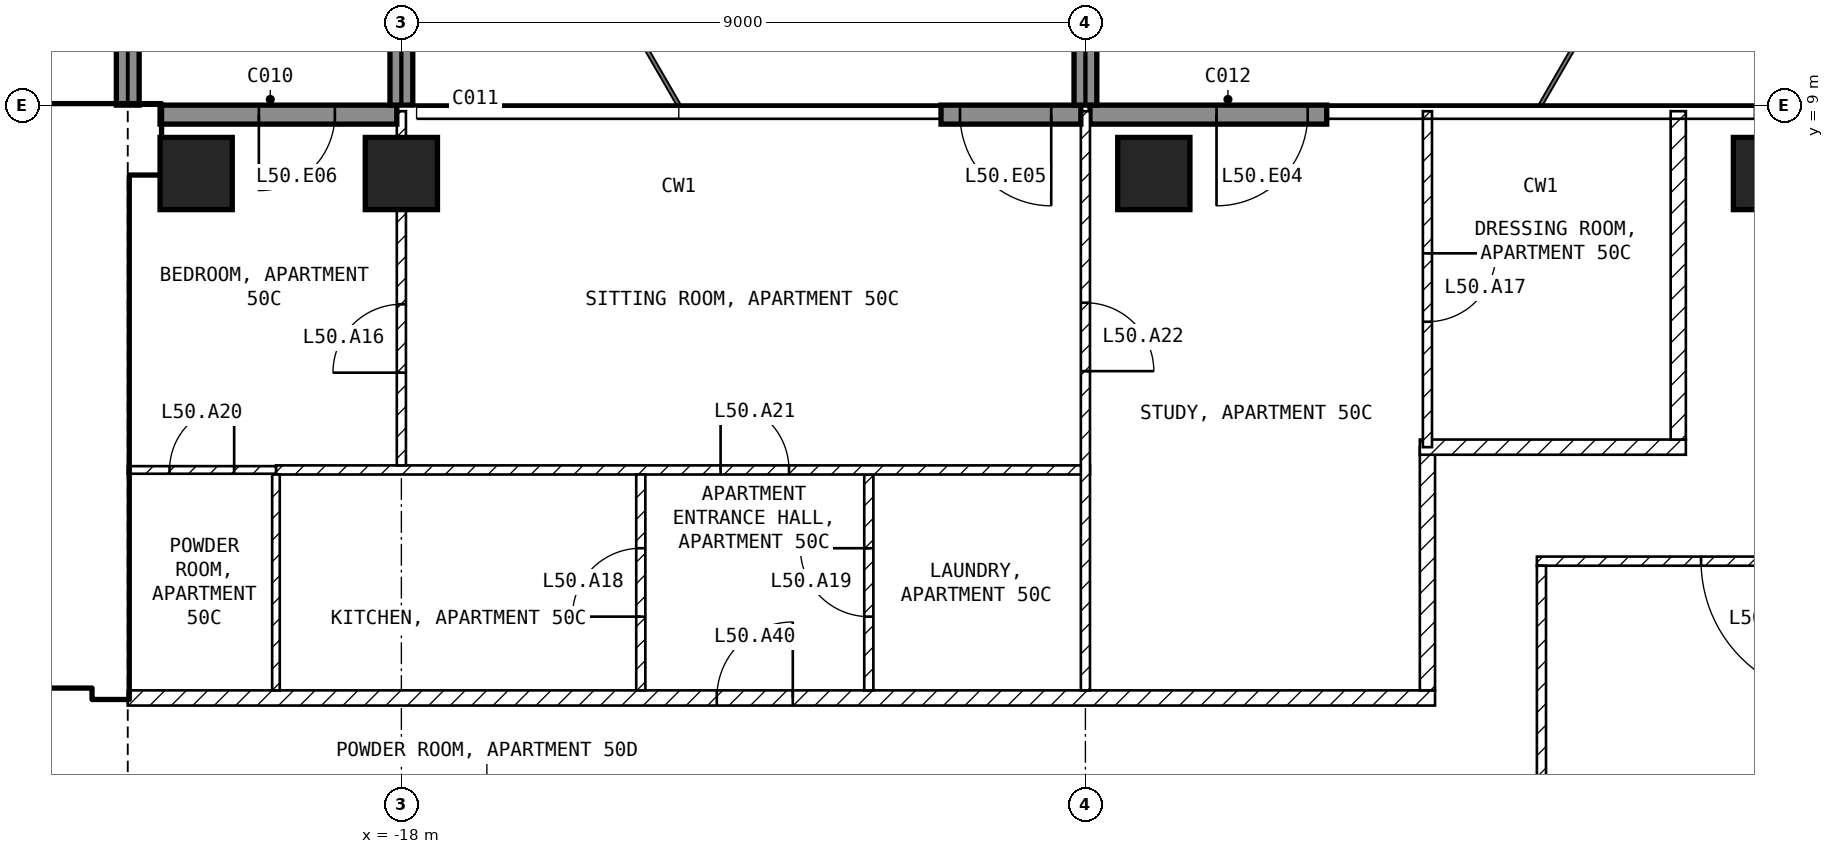
"""IFC4 building model, lengths in metres.
Left out: names, types, materials, properties, quantities, classifications, styles, units other than length and angle.
Written with IfcOpenShell. Run it as: python <this file> out.ifc"""

import sys

from ifc_helpers import new_model, si_unit, direction, frame, frame_2d, origin, origin_2d, place, context, subcontext, project, spatial, rectangle, extrude, element, fill, save


model = new_model("IFC4")
c1 = context("Model", 3, precision=1e-05, world=origin(), true_north=direction((0.0, 1.0)))
c2 = subcontext(c1, "Body", "Model", "MODEL_VIEW")
j1 = project(units=[si_unit("LENGTHUNIT", "METRE"), si_unit("PLANEANGLEUNIT", "RADIAN")], contexts=[c1])
p1 = place(None, origin())
s1 = spatial("IfcSite", under=j1, at=p1, CompositionType="ELEMENT")
p2 = place(p1, origin())
s2 = spatial("IfcBuilding", under=s1, at=p2, CompositionType="ELEMENT")
p3 = place(p2, frame((0.0, 0.0, 201.6)))
s3 = spatial("IfcBuildingStorey", under=s2, at=p3, CompositionType="ELEMENT", Elevation=201.6)
for number, where, z_axis, x_axis in (
    (1, (-20.7, 8.1, -0.25), (0.0, 0.0, 1.0), (1.0, 0.0, 0.0)),
    (2, (-18.0, 8.1, -0.25), (0.0, 0.0, 1.0), (1.0, 0.0, 0.0)),
    (3, (-8.1, 8.1, -0.25), (0.0, 0.0, 1.0), (1.0, 0.0, 0.0)),
    (4, (0.0, 8.1, -0.25), (0.0, 0.0, 1.0), (1.0, 0.0, 0.0)),
):
    element("IfcColumn", number, at=place(p3, frame(where, z_axis=z_axis, x_axis=x_axis)), inside=s3, PredefinedType="COLUMN", context=c2, shape_type="SweptSolid", body=[
        extrude(rectangle(XDim=0.95, YDim=0.95, at=origin_2d()), origin(), (0.0, 0.0, 1.0), 3.5),
    ])
p4 = place(p3, frame((-5.825, 8.875, 0.0), z_axis=(0.0, 0.0, 1.0), x_axis=(-1.0, 0.0, 0.0)))
e5 = element("IfcWall", 5, at=p4, inside=s3, PredefinedType="SOLIDWALL", context=c2, shape_type="SweptSolid", body=[
    extrude(rectangle(XDim=3.115, YDim=0.25, at=frame_2d((1.558, 0.0))), origin(), (0.0, 0.0, 1.0), 3.25),
])
p5 = place(p4, frame((0.25, 0.0, 0.0)))
e6 = element("IfcOpeningElement", 6, at=p5, cuts=e5, PredefinedType="OPENING", context=c2, shape_type="SweptSolid", body=[
    extrude(rectangle(XDim=1.2, YDim=2.4, at=frame_2d((0.6, 1.2))), frame((0.0, 0.135, 0.0), z_axis=(0.0, -1.0, 0.0), x_axis=(1.0, 0.0, 0.0)), (0.0, 0.0, 1.0), 0.27),
])
p6 = place(p3, frame((-9.06, 8.875, 0.0), z_axis=(0.0, 0.0, 1.0), x_axis=(-1.0, 0.0, 0.0)))
e7 = element("IfcWall", 7, at=p6, inside=s3, PredefinedType="SOLIDWALL", context=c2, shape_type="SweptSolid", body=[
    extrude(rectangle(XDim=1.84, YDim=0.25, at=frame_2d((0.92, 0.0))), origin(), (0.0, 0.0, 1.0), 3.25),
])
p7 = place(p6, frame((0.39, 0.0, 0.0)))
e8 = element("IfcOpeningElement", 8, at=p7, cuts=e7, PredefinedType="OPENING", context=c2, shape_type="SweptSolid", body=[
    extrude(rectangle(XDim=1.2, YDim=2.4, at=frame_2d((0.6, 1.2))), frame((0.0, 0.135, 0.0), z_axis=(0.0, -1.0, 0.0), x_axis=(1.0, 0.0, 0.0)), (0.0, 0.0, 1.0), 0.27),
])
p8 = place(p3, frame((-18.06, 8.875, 0.0), z_axis=(0.0, 0.0, 1.0), x_axis=(-1.0, 0.0, 0.0)))
e9 = element("IfcWall", 9, at=p8, inside=s3, PredefinedType="SOLIDWALL", context=c2, shape_type="SweptSolid", body=[
    extrude(rectangle(XDim=3.115, YDim=0.25, at=frame_2d((1.558, 0.0))), origin(), (0.0, 0.0, 1.0), 3.25),
])
p9 = place(p8, frame((0.815, 0.0, 0.0)))
e10 = element("IfcOpeningElement", 10, at=p9, cuts=e9, PredefinedType="OPENING", context=c2, shape_type="SweptSolid", body=[
    extrude(rectangle(XDim=1.0, YDim=2.4, at=frame_2d((0.5, 1.2))), frame((0.0, 0.135, 0.0), z_axis=(0.0, -1.0, 0.0), x_axis=(1.0, 0.0, 0.0)), (0.0, 0.0, 1.0), 0.27),
])
for number, where, z_axis, x_axis in (
    (11, (-21.6, 9.0, 0.0), (0.0, 0.0, 1.0), (0.0, 1.0, 0.0)),
    (12, (-18.0, 9.0, 0.0), (0.0, 0.0, 1.0), (0.0, 1.0, 0.0)),
    (13, (-9.0, 9.0, 0.0), (0.0, 0.0, 1.0), (0.0, 1.0, 0.0)),
):
    element("IfcWall", number, at=place(p3, frame(where, z_axis=z_axis, x_axis=x_axis)), inside=s3, PredefinedType="SOLIDWALL", context=c2, shape_type="SweptSolid", body=[
        extrude(rectangle(XDim=2.7, YDim=0.3, at=frame_2d((1.35, 0.0))), origin(), (0.0, 0.0, 1.0), 3.25),
    ])
p10 = place(p3, frame((-29.6, 8.55, 0.0), z_axis=(0.0, 0.0, 1.0), x_axis=(1.0, 0.0, 0.0)))
e14 = element("IfcWall", 14, at=p10, inside=s3, PredefinedType="SHEAR", context=c2, shape_type="SweptSolid", body=[
    extrude(rectangle(XDim=8.425, YDim=0.9, at=frame_2d((4.212, 0.0))), origin(), (0.0, 0.0, 1.0), 3.25),
])
p11 = place(p3, frame((-21.825, 1.2, 0.0), z_axis=(0.0, 0.0, 1.0), x_axis=(0.0, 1.0, 0.0)))
e15 = element("IfcWall", 15, at=p11, inside=s3, PredefinedType="SHEAR", context=c2, shape_type="SweptSolid", body=[
    extrude(rectangle(XDim=6.9, YDim=0.45, at=frame_2d((3.45, 0.0))), origin(), (0.0, 0.0, 1.0), 3.25),
])
p12 = place(p3, frame((-33.2, 1.45, 0.0), z_axis=(0.0, 0.0, 1.0), x_axis=(1.0, 0.0, 0.0)))
e16 = element("IfcWall", 16, at=p12, inside=s3, PredefinedType="SOLIDWALL", context=c2, shape_type="SweptSolid", body=[
    extrude(rectangle(XDim=11.15, YDim=0.2, at=frame_2d((5.575, 0.0))), origin(), (0.0, 0.0, 1.0), 3.25),
])
p13 = place(p12, frame((9.4, 0.0, 0.0)))
e17 = element("IfcOpeningElement", 17, at=p13, cuts=e16, PredefinedType="OPENING", context=c2, shape_type="SweptSolid", body=[
    extrude(rectangle(XDim=1.0, YDim=2.1, at=frame_2d((0.5, 1.05))), frame((0.0, 0.11, 0.0), z_axis=(0.0, -1.0, 0.0), x_axis=(1.0, 0.0, 0.0)), (0.0, 0.0, 1.0), 0.22),
])
p14 = place(p12, frame((6.9, 0.0, 0.0)))
e18 = element("IfcOpeningElement", 18, at=p14, cuts=e16, PredefinedType="OPENING", context=c2, shape_type="SweptSolid", body=[
    extrude(rectangle(XDim=1.0, YDim=2.1, at=frame_2d((0.5, 1.05))), frame((0.0, 0.11, 0.0), z_axis=(0.0, -1.0, 0.0), x_axis=(1.0, 0.0, 0.0)), (0.0, 0.0, 1.0), 0.22),
])
p15 = place(p12, frame((1.1, 0.0, 0.0)))
e19 = element("IfcOpeningElement", 19, at=p15, cuts=e16, PredefinedType="OPENING", context=c2, shape_type="SweptSolid", body=[
    extrude(rectangle(XDim=0.9, YDim=2.1, at=frame_2d((0.45, 1.05))), frame((0.0, 0.11, 0.0), z_axis=(0.0, -1.0, 0.0), x_axis=(1.0, 0.0, 0.0)), (0.0, 0.0, 1.0), 0.22),
])
p16 = place(p3, frame((-28.35, 5.15, 0.0), z_axis=(0.0, 0.0, 1.0), x_axis=(1.0, 0.0, 0.0)))
e20 = element("IfcWall", 20, at=p16, inside=s3, PredefinedType="SOLIDWALL", context=c2, shape_type="SweptSolid", body=[
    extrude(rectangle(XDim=6.3, YDim=0.2, at=frame_2d((3.15, 0.0))), origin(), (0.0, 0.0, 1.0), 3.25),
])
p17 = place(p16, frame((5.1, 0.0, 0.0)))
e21 = element("IfcOpeningElement", 21, at=p17, cuts=e20, PredefinedType="OPENING", context=c2, shape_type="SweptSolid", body=[
    extrude(rectangle(XDim=1.0, YDim=2.1, at=frame_2d((0.5, 1.05))), frame((0.0, 0.11, 0.0), z_axis=(0.0, -1.0, 0.0), x_axis=(1.0, 0.0, 0.0)), (0.0, 0.0, 1.0), 0.22),
])
p18 = place(p3, frame((3.06, 3.0, 0.0), z_axis=(0.0, 0.0, 1.0), x_axis=(-1.0, 0.0, 0.0)))
e22 = element("IfcWall", 22, at=p18, inside=s3, PredefinedType="PARTITIONING", context=c2, shape_type="SweptSolid", body=[
    extrude(rectangle(XDim=6.12, YDim=0.12, at=frame_2d((3.06, 0.0))), origin(), (0.0, 0.0, 1.0), 3.25),
])
p19 = place(p18, frame((2.16, 0.0, 0.0)))
e23 = element("IfcOpeningElement", 23, at=p19, cuts=e22, PredefinedType="OPENING", context=c2, shape_type="SweptSolid", body=[
    extrude(rectangle(XDim=1.8, YDim=2.1, at=frame_2d((0.9, 1.05))), frame((0.0, 0.07, 0.0), z_axis=(0.0, -1.0, 0.0), x_axis=(1.0, 0.0, 0.0)), (0.0, 0.0, 1.0), 0.14),
])
p20 = place(p3, frame((-3.0, 2.94, 0.0), z_axis=(0.0, 0.0, 1.0), x_axis=(0.0, -1.0, 0.0)))
e24 = element("IfcWall", 24, at=p20, inside=s3, PredefinedType="PARTITIONING", context=c2, shape_type="SweptSolid", body=[
    extrude(rectangle(XDim=5.88, YDim=0.12, at=frame_2d((2.94, 0.0))), origin(), (0.0, 0.0, 1.0), 3.25),
])
p21 = place(p3, frame((-21.6, 1.2, 0.0), z_axis=(0.0, 0.0, 1.0), x_axis=(1.0, 0.0, 0.0)))
e25 = element("IfcWall", 25, at=p21, inside=s3, PredefinedType="PARTITIONING", context=c2, shape_type="SweptSolid", body=[
    extrude(rectangle(XDim=17.2, YDim=0.2, at=frame_2d((8.6, 0.0))), origin(), (0.0, 0.0, 1.0), 3.25),
])
p22 = place(p21, frame((7.75, 0.0, 0.0)))
e26 = element("IfcOpeningElement", 26, at=p22, cuts=e25, PredefinedType="OPENING", context=c2, shape_type="SweptSolid", body=[
    extrude(rectangle(XDim=1.0, YDim=2.1, at=frame_2d((0.5, 1.05))), frame((0.0, 0.11, 0.0), z_axis=(0.0, -1.0, 0.0), x_axis=(1.0, 0.0, 0.0)), (0.0, 0.0, 1.0), 0.22),
])
p23 = place(p3, frame((-4.5, 1.3, 0.0), z_axis=(0.0, 0.0, 1.0), x_axis=(0.0, 1.0, 0.0)))
e27 = element("IfcWall", 27, at=p23, inside=s3, PredefinedType="PARTITIONING", context=c2, shape_type="SweptSolid", body=[
    extrude(rectangle(XDim=3.2, YDim=0.2, at=frame_2d((1.6, 0.0))), origin(), (0.0, 0.0, 1.0), 3.25),
])
p24 = place(p3, frame((-4.6, 4.5, 0.0), z_axis=(0.0, 0.0, 1.0), x_axis=(1.0, 0.0, 0.0)))
e28 = element("IfcWall", 28, at=p24, inside=s3, PredefinedType="PARTITIONING", context=c2, shape_type="SweptSolid", body=[
    extrude(rectangle(XDim=3.5, YDim=0.2, at=frame_2d((1.75, 0.0))), origin(), (0.0, 0.0, 1.0), 3.25),
])
p25 = place(p3, frame((-1.2, 4.6, 0.0), z_axis=(0.0, 0.0, 1.0), x_axis=(0.0, 1.0, 0.0)))
e29 = element("IfcWall", 29, at=p25, inside=s3, PredefinedType="PARTITIONING", context=c2, shape_type="SweptSolid", body=[
    extrude(rectangle(XDim=4.32, YDim=0.2, at=frame_2d((2.16, 0.0))), origin(), (0.0, 0.0, 1.0), 3.25),
])
p26 = place(p3, frame((-11.85, 1.3, 0.0), z_axis=(0.0, 0.0, 1.0), x_axis=(0.0, 1.0, 0.0)))
e30 = element("IfcWall", 30, at=p26, inside=s3, PredefinedType="PARTITIONING", context=c2, shape_type="SweptSolid", body=[
    extrude(rectangle(XDim=2.84, YDim=0.12, at=frame_2d((1.42, 0.0))), origin(), (0.0, 0.0, 1.0), 3.25),
])
p27 = place(p26, frame((0.97, 0.0, 0.0)))
e31 = element("IfcOpeningElement", 31, at=p27, cuts=e30, PredefinedType="OPENING", context=c2, shape_type="SweptSolid", body=[
    extrude(rectangle(XDim=0.9, YDim=2.1, at=frame_2d((0.45, 1.05))), frame((0.0, 0.07, 0.0), z_axis=(0.0, -1.0, 0.0), x_axis=(1.0, 0.0, 0.0)), (0.0, 0.0, 1.0), 0.14),
])
p28 = place(p3, frame((-19.65, 4.2, 0.0), z_axis=(0.0, 0.0, 1.0), x_axis=(1.0, 0.0, 0.0)))
e32 = element("IfcWall", 32, at=p28, inside=s3, PredefinedType="PARTITIONING", context=c2, shape_type="SweptSolid", body=[
    extrude(rectangle(XDim=10.71, YDim=0.12, at=frame_2d((5.355, 0.0))), origin(), (0.0, 0.0, 1.0), 3.25),
])
p29 = place(p28, frame((5.85, 0.0, 0.0)))
e33 = element("IfcOpeningElement", 33, at=p29, cuts=e32, PredefinedType="OPENING", context=c2, shape_type="SweptSolid", body=[
    extrude(rectangle(XDim=0.9, YDim=2.1, at=frame_2d((0.45, 1.05))), frame((0.0, 0.07, 0.0), z_axis=(0.0, -1.0, 0.0), x_axis=(1.0, 0.0, 0.0)), (0.0, 0.0, 1.0), 0.14),
])
p30 = place(p3, frame((-9.0, 8.92, 0.0), z_axis=(0.0, 0.0, 1.0), x_axis=(0.0, -1.0, 0.0)))
e34 = element("IfcWall", 34, at=p30, inside=s3, PredefinedType="PARTITIONING", context=c2, shape_type="SweptSolid", body=[
    extrude(rectangle(XDim=7.62, YDim=0.12, at=frame_2d((3.81, 0.0))), origin(), (0.0, 0.0, 1.0), 3.25),
])
p31 = place(p30, frame((2.52, 0.0, 0.0)))
e35 = element("IfcOpeningElement", 35, at=p31, cuts=e34, PredefinedType="OPENING", context=c2, shape_type="SweptSolid", body=[
    extrude(rectangle(XDim=0.9, YDim=2.1, at=frame_2d((0.45, 1.05))), frame((0.0, 0.07, 0.0), z_axis=(0.0, -1.0, 0.0), x_axis=(1.0, 0.0, 0.0)), (0.0, 0.0, 1.0), 0.14),
])
p32 = place(p3, frame((-14.85, 1.3, 0.0), z_axis=(0.0, 0.0, 1.0), x_axis=(0.0, 1.0, 0.0)))
e36 = element("IfcWall", 36, at=p32, inside=s3, PredefinedType="PARTITIONING", context=c2, shape_type="SweptSolid", body=[
    extrude(rectangle(XDim=2.84, YDim=0.12, at=frame_2d((1.42, 0.0))), origin(), (0.0, 0.0, 1.0), 3.25),
])
p33 = place(p32, frame((0.97, 0.0, 0.0)))
e37 = element("IfcOpeningElement", 37, at=p33, cuts=e36, PredefinedType="OPENING", context=c2, shape_type="SweptSolid", body=[
    extrude(rectangle(XDim=0.9, YDim=2.1, at=frame_2d((0.45, 1.05))), frame((0.0, 0.07, 0.0), z_axis=(0.0, -1.0, 0.0), x_axis=(1.0, 0.0, 0.0)), (0.0, 0.0, 1.0), 0.14),
])
p34 = place(p3, frame((-19.65, 1.3, 0.0), z_axis=(0.0, 0.0, 1.0), x_axis=(0.0, 1.0, 0.0)))
e38 = element("IfcWall", 38, at=p34, inside=s3, PredefinedType="PARTITIONING", context=c2, shape_type="SweptSolid", body=[
    extrude(rectangle(XDim=2.84, YDim=0.1, at=frame_2d((1.42, 0.0))), origin(), (0.0, 0.0, 1.0), 3.25),
])
p35 = place(p3, frame((-21.6, 4.2, 0.0), z_axis=(0.0, 0.0, 1.0), x_axis=(1.0, 0.0, 0.0)))
e39 = element("IfcWall", 39, at=p35, inside=s3, PredefinedType="PARTITIONING", context=c2, shape_type="SweptSolid", body=[
    extrude(rectangle(XDim=1.95, YDim=0.1, at=frame_2d((0.975, 0.0))), origin(), (0.0, 0.0, 1.0), 3.25),
])
p36 = place(p35, frame((0.55, 0.0, 0.0)))
e40 = element("IfcOpeningElement", 40, at=p36, cuts=e39, PredefinedType="OPENING", context=c2, shape_type="SweptSolid", body=[
    extrude(rectangle(XDim=0.85, YDim=2.1, at=frame_2d((0.425, 1.05))), frame((0.0, 0.06, 0.0), z_axis=(0.0, -1.0, 0.0), x_axis=(1.0, 0.0, 0.0)), (0.0, 0.0, 1.0), 0.12),
])
p37 = place(p3, frame((-18.0, 4.26, 0.0), z_axis=(0.0, 0.0, 1.0), x_axis=(0.0, 1.0, 0.0)))
e41 = element("IfcWall", 41, at=p37, inside=s3, PredefinedType="PARTITIONING", context=c2, shape_type="SweptSolid", body=[
    extrude(rectangle(XDim=4.66, YDim=0.12, at=frame_2d((2.33, 0.0))), origin(), (0.0, 0.0, 1.0), 2.48),
])
p38 = place(p37, frame((1.22, 0.0, 0.0)))
e42 = element("IfcOpeningElement", 42, at=p38, cuts=e41, PredefinedType="OPENING", context=c2, shape_type="SweptSolid", body=[
    extrude(rectangle(XDim=0.9, YDim=2.1, at=frame_2d((0.45, 1.05))), frame((0.0, 0.07, 0.0), z_axis=(0.0, -1.0, 0.0), x_axis=(1.0, 0.0, 0.0)), (0.0, 0.0, 1.0), 0.14),
])
p39 = place(p3, frame((-4.5, 8.92, 0.0), z_axis=(0.0, 0.0, 1.0), x_axis=(0.0, -1.0, 0.0)))
e43 = element("IfcWall", 43, at=p39, inside=s3, PredefinedType="PARTITIONING", context=c2, shape_type="SweptSolid", body=[
    extrude(rectangle(XDim=4.42, YDim=0.12, at=frame_2d((2.21, 0.0))), origin(), (0.0, 0.0, 1.0), 3.25),
])
p40 = place(p39, frame((1.87, 0.0, 0.0)))
e44 = element("IfcOpeningElement", 44, at=p40, cuts=e43, PredefinedType="OPENING", context=c2, shape_type="SweptSolid", body=[
    extrude(rectangle(XDim=0.9, YDim=2.1, at=frame_2d((0.45, 1.05))), frame((0.0, 0.07, 0.0), z_axis=(0.0, -1.0, 0.0), x_axis=(1.0, 0.0, 0.0)), (0.0, 0.0, 1.0), 0.14),
])
p41 = place(p5, origin())
e45 = element("IfcDoor", 45, at=p41, inside=s3, OperationType="SINGLE_SWING_RIGHT", PredefinedType="DOOR", context=c2, shape_type="SweptSolid", body=[
    extrude(rectangle(XDim=1.2, YDim=2.4, at=frame_2d((0.6, 1.2))), frame((0.0, 0.025, 0.0), z_axis=(0.0, -1.0, 0.0), x_axis=(1.0, 0.0, 0.0)), (0.0, 0.0, 1.0), 0.05),
])
fill(e6, e45)
p42 = place(p7, origin())
e46 = element("IfcDoor", 46, at=p42, inside=s3, OperationType="SINGLE_SWING_LEFT", PredefinedType="DOOR", context=c2, shape_type="SweptSolid", body=[
    extrude(rectangle(XDim=1.2, YDim=2.4, at=frame_2d((0.6, 1.2))), frame((0.0, 0.025, 0.0), z_axis=(0.0, -1.0, 0.0), x_axis=(1.0, 0.0, 0.0)), (0.0, 0.0, 1.0), 0.05),
])
fill(e8, e46)
p43 = place(p9, origin())
e47 = element("IfcDoor", 47, at=p43, inside=s3, OperationType="SINGLE_SWING_RIGHT", PredefinedType="DOOR", context=c2, shape_type="SweptSolid", body=[
    extrude(rectangle(XDim=1.0, YDim=2.4, at=frame_2d((0.5, 1.2))), frame((0.0, 0.025, 0.0), z_axis=(0.0, -1.0, 0.0), x_axis=(1.0, 0.0, 0.0)), (0.0, 0.0, 1.0), 0.05),
])
fill(e10, e47)
p44 = place(p17, origin())
e48 = element("IfcDoor", 48, at=p44, inside=s3, OperationType="SINGLE_SWING_LEFT", PredefinedType="DOOR", context=c2, shape_type="SweptSolid", body=[
    extrude(rectangle(XDim=1.0, YDim=2.1, at=frame_2d((0.5, 1.05))), frame((0.0, 0.025, 0.0), z_axis=(0.0, -1.0, 0.0), x_axis=(1.0, 0.0, 0.0)), (0.0, 0.0, 1.0), 0.05),
])
fill(e21, e48)
p45 = place(p19, origin())
e49 = element("IfcDoor", 49, at=p45, inside=s3, OperationType="SINGLE_SWING_LEFT", PredefinedType="DOOR", context=c2, shape_type="SweptSolid", body=[
    extrude(rectangle(XDim=1.8, YDim=2.1, at=frame_2d((0.9, 1.05))), frame((0.0, 0.025, 0.0), z_axis=(0.0, -1.0, 0.0), x_axis=(1.0, 0.0, 0.0)), (0.0, 0.0, 1.0), 0.05),
])
fill(e23, e49)
p46 = place(p38, origin())
e50 = element("IfcDoor", 50, at=p46, inside=s3, OperationType="SINGLE_SWING_LEFT", PredefinedType="DOOR", context=c2, shape_type="SweptSolid", body=[
    extrude(rectangle(XDim=0.9, YDim=2.1, at=frame_2d((0.45, 1.05))), frame((0.0, 0.025, 0.0), z_axis=(0.0, -1.0, 0.0), x_axis=(1.0, 0.0, 0.0)), (0.0, 0.0, 1.0), 0.05),
])
fill(e42, e50)
p47 = place(p40, origin())
e51 = element("IfcDoor", 51, at=p47, inside=s3, OperationType="SINGLE_SWING_LEFT", PredefinedType="DOOR", context=c2, shape_type="SweptSolid", body=[
    extrude(rectangle(XDim=0.9, YDim=2.1, at=frame_2d((0.45, 1.05))), frame((0.0, 0.025, 0.0), z_axis=(0.0, -1.0, 0.0), x_axis=(1.0, 0.0, 0.0)), (0.0, 0.0, 1.0), 0.05),
])
fill(e44, e51)
p48 = place(p33, origin())
e52 = element("IfcDoor", 52, at=p48, inside=s3, OperationType="SINGLE_SWING_LEFT", PredefinedType="DOOR", context=c2, shape_type="SweptSolid", body=[
    extrude(rectangle(XDim=0.9, YDim=2.1, at=frame_2d((0.45, 1.05))), frame((0.0, 0.025, 0.0), z_axis=(0.0, -1.0, 0.0), x_axis=(1.0, 0.0, 0.0)), (0.0, 0.0, 1.0), 0.05),
])
fill(e37, e52)
p49 = place(p27, origin())
e53 = element("IfcDoor", 53, at=p49, inside=s3, OperationType="SINGLE_SWING_RIGHT", PredefinedType="DOOR", context=c2, shape_type="SweptSolid", body=[
    extrude(rectangle(XDim=0.9, YDim=2.1, at=frame_2d((0.45, 1.05))), frame((0.0, 0.025, 0.0), z_axis=(0.0, -1.0, 0.0), x_axis=(1.0, 0.0, 0.0)), (0.0, 0.0, 1.0), 0.05),
])
fill(e31, e53)
p50 = place(p36, origin())
e54 = element("IfcDoor", 54, at=p50, inside=s3, OperationType="SINGLE_SWING_RIGHT", PredefinedType="DOOR", context=c2, shape_type="SweptSolid", body=[
    extrude(rectangle(XDim=0.85, YDim=2.1, at=frame_2d((0.425, 1.05))), frame((0.0, 0.025, 0.0), z_axis=(0.0, -1.0, 0.0), x_axis=(1.0, 0.0, 0.0)), (0.0, 0.0, 1.0), 0.05),
])
fill(e40, e54)
p51 = place(p29, origin())
e55 = element("IfcDoor", 55, at=p51, inside=s3, OperationType="SINGLE_SWING_LEFT", PredefinedType="DOOR", context=c2, shape_type="SweptSolid", body=[
    extrude(rectangle(XDim=0.9, YDim=2.1, at=frame_2d((0.45, 1.05))), frame((0.0, 0.025, 0.0), z_axis=(0.0, -1.0, 0.0), x_axis=(1.0, 0.0, 0.0)), (0.0, 0.0, 1.0), 0.05),
])
fill(e33, e55)
p52 = place(p31, origin())
e56 = element("IfcDoor", 56, at=p52, inside=s3, OperationType="SINGLE_SWING_RIGHT", PredefinedType="DOOR", context=c2, shape_type="SweptSolid", body=[
    extrude(rectangle(XDim=0.9, YDim=2.1, at=frame_2d((0.45, 1.05))), frame((0.0, 0.025, 0.0), z_axis=(0.0, -1.0, 0.0), x_axis=(1.0, 0.0, 0.0)), (0.0, 0.0, 1.0), 0.05),
])
fill(e35, e56)
p53 = place(p22, origin())
e57 = element("IfcDoor", 57, at=p53, inside=s3, OperationType="SINGLE_SWING_RIGHT", PredefinedType="DOOR", context=c2, shape_type="SweptSolid", body=[
    extrude(rectangle(XDim=1.0, YDim=2.1, at=frame_2d((0.5, 1.05))), frame((0.0, 0.025, 0.0), z_axis=(0.0, -1.0, 0.0), x_axis=(1.0, 0.0, 0.0)), (0.0, 0.0, 1.0), 0.05),
])
fill(e26, e57)
save(model, sys.argv[1])
